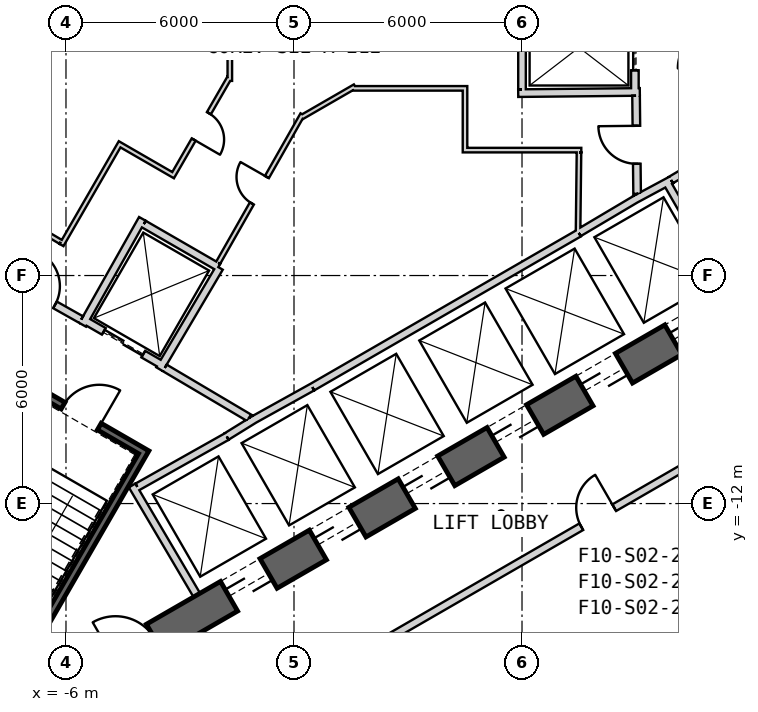
"""IFC4 building model, lengths in metres.
Left out: names, types, materials, properties, quantities, classifications, styles, units other than length and angle.
Written with IfcOpenShell. Run it as: python <this file> out.ifc"""

import sys

from ifc_helpers import new_model, si_unit, direction, frame, frame_2d, origin, place, context, subcontext, project, spatial, rectangle, extrude, element, fill, save


model = new_model("IFC4")
c1 = context("Model", 3, precision=1e-05, world=origin(), true_north=direction((0.0, 1.0)))
c2 = subcontext(c1, "Body", "Model", "MODEL_VIEW")
j1 = project(units=[si_unit("LENGTHUNIT", "METRE"), si_unit("PLANEANGLEUNIT", "RADIAN")], contexts=[c1])
p1 = place(None, origin())
s1 = spatial("IfcSite", under=j1, at=p1, CompositionType="ELEMENT")
p2 = place(p1, origin())
s2 = spatial("IfcBuilding", under=s1, at=p2, CompositionType="ELEMENT")
p3 = place(p2, frame((0.0, 0.0, 70.1)))
s3 = spatial("IfcBuildingStorey", under=s2, at=p3, CompositionType="ELEMENT", Elevation=70.1)
p4 = place(p3, frame((-7.825, -17.97, 0.0), z_axis=(0.0, 0.0, 1.0), x_axis=(0.866028369851, 0.499994862586, 0.0)))
e1 = element("IfcWall", 1, at=p4, inside=s3, PredefinedType="SHEAR", context=c2, shape_type="SweptSolid", body=[
    extrude(rectangle(XDim=31.523, YDim=0.9, at=frame_2d((15.762, 0.0))), origin(), (0.0, 0.0, 1.0), 4.1),
])
p5 = place(p4, frame((7.062, 0.0, 0.0)))
e2 = element("IfcOpeningElement", 2, at=p5, cuts=e1, PredefinedType="OPENING", context=c2, shape_type="SweptSolid", body=[
    extrude(rectangle(XDim=1.2, YDim=2.4, at=frame_2d((0.6, 1.2))), frame((0.0, 0.46, 0.0), z_axis=(0.0, -1.0, 0.0), x_axis=(1.0, 0.0, 0.0)), (0.0, 0.0, 1.0), 0.92),
])
p6 = place(p4, frame((9.762, 0.0, 0.0)))
e3 = element("IfcOpeningElement", 3, at=p6, cuts=e1, PredefinedType="OPENING", context=c2, shape_type="SweptSolid", body=[
    extrude(rectangle(XDim=1.2, YDim=2.4, at=frame_2d((0.6, 1.2))), frame((0.0, 0.46, 0.0), z_axis=(0.0, -1.0, 0.0), x_axis=(1.0, 0.0, 0.0)), (0.0, 0.0, 1.0), 0.92),
])
p7 = place(p4, frame((12.462, 0.0, 0.0)))
e4 = element("IfcOpeningElement", 4, at=p7, cuts=e1, PredefinedType="OPENING", context=c2, shape_type="SweptSolid", body=[
    extrude(rectangle(XDim=1.2, YDim=2.4, at=frame_2d((0.6, 1.2))), frame((0.0, 0.46, 0.0), z_axis=(0.0, -1.0, 0.0), x_axis=(1.0, 0.0, 0.0)), (0.0, 0.0, 1.0), 0.92),
])
p8 = place(p4, frame((15.162, 0.0, 0.0)))
e5 = element("IfcOpeningElement", 5, at=p8, cuts=e1, PredefinedType="OPENING", context=c2, shape_type="SweptSolid", body=[
    extrude(rectangle(XDim=1.2, YDim=2.4, at=frame_2d((0.6, 1.2))), frame((0.0, 0.46, 0.0), z_axis=(0.0, -1.0, 0.0), x_axis=(1.0, 0.0, 0.0)), (0.0, 0.0, 1.0), 0.92),
])
p9 = place(p4, frame((17.862, 0.0, 0.0)))
e6 = element("IfcOpeningElement", 6, at=p9, cuts=e1, PredefinedType="OPENING", context=c2, shape_type="SweptSolid", body=[
    extrude(rectangle(XDim=1.2, YDim=2.4, at=frame_2d((0.6, 1.2))), frame((0.0, 0.46, 0.0), z_axis=(0.0, -1.0, 0.0), x_axis=(1.0, 0.0, 0.0)), (0.0, 0.0, 1.0), 0.92),
])
p10 = place(p4, frame((20.562, 0.0, 0.0)))
e7 = element("IfcOpeningElement", 7, at=p10, cuts=e1, PredefinedType="OPENING", context=c2, shape_type="SweptSolid", body=[
    extrude(rectangle(XDim=1.2, YDim=2.4, at=frame_2d((0.6, 1.2))), frame((0.0, 0.46, 0.0), z_axis=(0.0, -1.0, 0.0), x_axis=(1.0, 0.0, 0.0)), (0.0, 0.0, 1.0), 0.92),
])
p11 = place(p4, frame((26.712, 0.0, 0.0)))
e8 = element("IfcOpeningElement", 8, at=p11, cuts=e1, PredefinedType="OPENING", context=c2, shape_type="SweptSolid", body=[
    extrude(rectangle(XDim=1.2, YDim=2.4, at=frame_2d((0.6, 1.2))), frame((0.0, 0.46, 0.0), z_axis=(0.0, -1.0, 0.0), x_axis=(1.0, 0.0, 0.0)), (0.0, 0.0, 1.0), 0.92),
])
p12 = place(p4, frame((3.612, 0.0, 0.0)))
e9 = element("IfcOpeningElement", 9, at=p12, cuts=e1, PredefinedType="OPENING", context=c2, shape_type="SweptSolid", body=[
    extrude(rectangle(XDim=1.2, YDim=2.4, at=frame_2d((0.6, 1.2))), frame((0.0, 0.46, 0.0), z_axis=(0.0, -1.0, 0.0), x_axis=(1.0, 0.0, 0.0)), (0.0, 0.0, 1.0), 0.92),
])
p13 = place(p3, frame((0.483, -8.936, 0.0), z_axis=(0.0, 0.0, 1.0), x_axis=(0.866030989016, 0.499990325971, 0.0)))
e10 = element("IfcWall", 10, at=p13, inside=s3, PredefinedType="PLUMBINGWALL", context=c2, shape_type="SweptSolid", body=[
    extrude(rectangle(XDim=8.1, YDim=0.2, at=frame_2d((4.05, 0.0))), origin(), (0.0, 0.0, 1.0), 3.8),
])
p14 = place(p3, frame((9.795, -3.525, 0.0), z_axis=(0.0, 0.0, 1.0), x_axis=(0.499984717929, -0.866034226713, 0.0)))
e11 = element("IfcWall", 11, at=p14, inside=s3, PredefinedType="PLUMBINGWALL", context=c2, shape_type="SweptSolid", body=[
    extrude(rectangle(XDim=3.25, YDim=0.2, at=frame_2d((1.625, 0.0))), origin(), (0.0, 0.0, 1.0), 3.8),
])
p15 = place(p3, frame((8.974, -3.999, 0.0), z_axis=(0.0, 0.0, 1.0), x_axis=(0.880907015104, 0.473289373154, 0.0)))
e12 = element("IfcWall", 12, at=p15, inside=s3, PredefinedType="PLUMBINGWALL", context=c2, shape_type="SweptSolid", body=[
    extrude(rectangle(XDim=1.078, YDim=0.2, at=frame_2d((0.539, 0.0))), origin(), (0.0, 0.0, 1.0), 3.8),
])
p16 = place(p3, frame((7.493, -4.878, 0.0), z_axis=(0.0, 0.0, 1.0), x_axis=(0.859981807212, 0.510324691999, 0.0)))
e13 = element("IfcWall", 13, at=p16, inside=s3, PredefinedType="PLUMBINGWALL", context=c2, shape_type="SweptSolid", body=[
    extrude(rectangle(XDim=1.845, YDim=0.2, at=frame_2d((0.922, 0.0))), origin(), (0.0, 0.0, 1.0), 3.8),
])
p17 = place(p3, frame((-2.558, -14.409, 0.0), z_axis=(0.0, 0.0, 1.0), x_axis=(-0.507997497166, 0.861358544901, 0.0)))
e14 = element("IfcWall", 14, at=p17, inside=s3, PredefinedType="PLUMBINGWALL", context=c2, shape_type="SweptSolid", body=[
    extrude(rectangle(XDim=3.35, YDim=0.2, at=frame_2d((1.675, 0.0))), origin(), (0.0, 0.0, 1.0), 3.8),
])
p18 = place(p3, frame((-1.769, -10.237, 0.0), z_axis=(0.0, 0.0, 1.0), x_axis=(-0.871534483978, -0.490334215854, 0.0)))
e15 = element("IfcWall", 15, at=p18, inside=s3, PredefinedType="PLUMBINGWALL", context=c2, shape_type="SweptSolid", body=[
    extrude(rectangle(XDim=2.7, YDim=0.2, at=frame_2d((1.35, 0.0))), origin(), (0.0, 0.0, 1.0), 3.8),
])
p19 = place(p3, frame((-1.024, -9.771, 0.0), z_axis=(0.0, 0.0, 1.0), x_axis=(-0.850348075135, -0.526220629693, 0.0)))
e16 = element("IfcWall", 16, at=p19, inside=s3, PredefinedType="PLUMBINGWALL", context=c2, shape_type="SweptSolid", body=[
    extrude(rectangle(XDim=0.878, YDim=0.2, at=frame_2d((0.439, 0.0))), origin(), (0.0, 0.0, 1.0), 3.8),
])
p20 = place(p3, frame((-1.13, -9.831, 0.0), z_axis=(0.0, 0.0, 1.0), x_axis=(0.874269620932, 0.485440655401, 0.0)))
e17 = element("IfcWall", 17, at=p20, inside=s3, PredefinedType="PLUMBINGWALL", context=c2, shape_type="SweptSolid", body=[
    extrude(rectangle(XDim=1.845, YDim=0.2, at=frame_2d((0.922, 0.0))), origin(), (0.0, 0.0, 1.0), 3.8),
])
p21 = place(p3, frame((8.97, 1.2, 0.0), z_axis=(0.0, 0.0, 1.0), x_axis=(0.0, -1.0, 0.0)))
e18 = element("IfcWall", 18, at=p21, inside=s3, PredefinedType="PLUMBINGWALL", context=c2, shape_type="SweptSolid", body=[
    extrude(rectangle(XDim=2.4, YDim=0.2, at=frame_2d((1.2, 0.0))), origin(), (0.0, 0.0, 1.0), 3.8),
])
p22 = place(p21, frame((0.6, 0.0, 0.0)))
e19 = element("IfcOpeningElement", 19, at=p22, cuts=e18, PredefinedType="OPENING", context=c2, shape_type="SweptSolid", body=[
    extrude(rectangle(XDim=1.2, YDim=2.4, at=frame_2d((0.6, 1.2))), frame((0.0, 0.11, 0.0), z_axis=(0.0, -1.0, 0.0), x_axis=(1.0, 0.0, 0.0)), (0.0, 0.0, 1.0), 0.22),
])
p23 = place(p3, frame((5.9, -1.201, 0.0), z_axis=(0.0, 0.0, 1.0), x_axis=(0.999950064753, 0.009993397809, 0.0)))
e20 = element("IfcWall", 20, at=p23, inside=s3, PredefinedType="PLUMBINGWALL", context=c2, shape_type="SweptSolid", body=[
    extrude(rectangle(XDim=3.2, YDim=0.2, at=frame_2d((1.6, 0.0))), origin(), (0.0, 0.0, 1.0), 3.8),
])
p24 = place(p3, frame((6.0, -1.1, 0.0), z_axis=(0.0, 0.0, 1.0), x_axis=(0.0, 1.0, 0.0)))
e21 = element("IfcWall", 21, at=p24, inside=s3, PredefinedType="PLUMBINGWALL", context=c2, shape_type="SweptSolid", body=[
    extrude(rectangle(XDim=2.28, YDim=0.2, at=frame_2d((1.14, 0.0))), origin(), (0.0, 0.0, 1.0), 3.8),
])
p25 = place(p3, frame((-3.905, -10.563, -0.3), z_axis=(0.0, 0.0, 1.0), x_axis=(-0.500012932018, -0.866017937352, 0.0)))
e22 = element("IfcWall", 22, at=p25, inside=s3, PredefinedType="SHEAR", context=c2, shape_type="SweptSolid", body=[
    extrude(rectangle(XDim=8.1, YDim=0.2, at=frame_2d((4.05, 0.0))), origin(), (0.0, 0.0, 1.0), 4.1),
])
p26 = place(p3, frame((-4.041, -10.599, -0.3), z_axis=(0.0, 0.0, 1.0), x_axis=(-0.866047807691, 0.499961193289, 0.0)))
e23 = element("IfcWall", 23, at=p26, inside=s3, PredefinedType="SHEAR", context=c2, shape_type="SweptSolid", body=[
    extrude(rectangle(XDim=3.6, YDim=0.2, at=frame_2d((1.8, 0.0))), origin(), (0.0, 0.0, 1.0), 4.1),
])
p27 = place(p26, frame((1.25, 0.0, 0.3)))
e24 = element("IfcOpeningElement", 24, at=p27, cuts=e23, PredefinedType="OPENING", context=c2, shape_type="SweptSolid", body=[
    extrude(rectangle(XDim=1.1, YDim=2.1, at=frame_2d((0.55, 1.05))), frame((0.0, 0.11, 0.0), z_axis=(0.0, -1.0, 0.0), x_axis=(1.0, 0.0, 0.0)), (0.0, 0.0, 1.0), 0.22),
])
p28 = place(p3, frame((-3.446, -8.368, 0.0), z_axis=(0.0, 0.0, 1.0), x_axis=(-0.866024647952, 0.500001309137, 0.0)))
e25 = element("IfcWall", 25, at=p28, inside=s3, PredefinedType="PLUMBINGWALL", context=c2, shape_type="SweptSolid", body=[
    extrude(rectangle(XDim=2.4, YDim=0.2, at=frame_2d((1.2, 0.0))), origin(), (0.0, 0.0, 1.0), 3.8),
])
p29 = place(p28, frame((0.6, 0.0, 0.0)))
e26 = element("IfcOpeningElement", 26, at=p29, cuts=e25, PredefinedType="OPENING", context=c2, shape_type="SweptSolid", body=[
    extrude(rectangle(XDim=1.2, YDim=2.4, at=frame_2d((0.6, 1.2))), frame((0.0, 0.11, 0.0), z_axis=(0.0, -1.0, 0.0), x_axis=(1.0, 0.0, 0.0)), (0.0, 0.0, 1.0), 0.22),
])
p30 = place(p3, frame((-1.961, -5.796, 0.0), z_axis=(0.0, 0.0, 1.0), x_axis=(-0.508647062354, -0.860975125052, 0.0)))
e27 = element("IfcWall", 27, at=p30, inside=s3, PredefinedType="PLUMBINGWALL", context=c2, shape_type="SweptSolid", body=[
    extrude(rectangle(XDim=3.1, YDim=0.2, at=frame_2d((1.55, 0.0))), origin(), (0.0, 0.0, 1.0), 3.8),
])
p31 = place(p3, frame((-3.99, -4.509, 0.0), z_axis=(0.0, 0.0, 1.0), x_axis=(-0.491358283181, -0.870957540612, 0.0)))
e28 = element("IfcWall", 28, at=p31, inside=s3, PredefinedType="PLUMBINGWALL", context=c2, shape_type="SweptSolid", body=[
    extrude(rectangle(XDim=3.2, YDim=0.2, at=frame_2d((1.6, 0.0))), origin(), (0.0, 0.0, 1.0), 3.8),
])
p32 = place(p3, frame((-3.953, -4.646, 0.0), z_axis=(0.0, 0.0, 1.0), x_axis=(0.866065302921, -0.4999308863, 0.0)))
e29 = element("IfcWall", 29, at=p32, inside=s3, PredefinedType="PLUMBINGWALL", context=c2, shape_type="SweptSolid", body=[
    extrude(rectangle(XDim=2.264, YDim=0.2, at=frame_2d((1.132, 0.0))), origin(), (0.0, 0.0, 1.0), 3.8),
])
p33 = place(p3, frame((12.245, -2.109, 0.0), z_axis=(0.0, 0.0, 1.0), x_axis=(-0.860414880418, -0.509594185166, 0.0)))
e30 = element("IfcWall", 30, at=p33, inside=s3, PredefinedType="PARTITIONING", context=c2, shape_type="SweptSolid", body=[
    extrude(rectangle(XDim=2.7, YDim=0.2, at=frame_2d((1.35, 0.0))), origin(), (0.0, 0.0, 1.0), 3.8),
])
p34 = place(p3, frame((9.029, -3.851, 0.0), z_axis=(0.0, 0.0, 1.0), x_axis=(-0.010783593937, 0.99994185536, 0.0)))
e31 = element("IfcWall", 31, at=p34, inside=s3, PredefinedType="PARTITIONING", context=c2, shape_type="SweptSolid", body=[
    extrude(rectangle(XDim=2.581, YDim=0.2, at=frame_2d((1.291, 0.0))), origin(), (0.0, 0.0, 1.0), 3.8),
])
p35 = place(p34, frame((0.791, 0.0, 0.0)))
e32 = element("IfcOpeningElement", 32, at=p35, cuts=e31, PredefinedType="OPENING", context=c2, shape_type="SweptSolid", body=[
    extrude(rectangle(XDim=1.0, YDim=2.1, at=frame_2d((0.5, 1.05))), frame((0.0, 0.11, 0.0), z_axis=(0.0, -1.0, 0.0), x_axis=(1.0, 0.0, 0.0)), (0.0, 0.0, 1.0), 0.22),
])
p36 = place(p3, frame((-3.401, -8.43, 0.0), z_axis=(0.0, 0.0, 1.0), x_axis=(0.860615607571, -0.509255118781, 0.0)))
e33 = element("IfcWall", 33, at=p36, inside=s3, PredefinedType="PARTITIONING", context=c2, shape_type="SweptSolid", body=[
    extrude(rectangle(XDim=2.581, YDim=0.2, at=frame_2d((1.29, 0.0))), origin(), (0.0, 0.0, 1.0), 3.8),
])
p37 = place(p3, frame((-7.849, -5.894, 0.0), z_axis=(0.0, 0.0, 1.0), x_axis=(0.871363259478, -0.490638431059, 0.0)))
e34 = element("IfcWall", 34, at=p37, inside=s3, PredefinedType="PARTITIONING", context=c2, shape_type="SweptSolid", body=[
    extrude(rectangle(XDim=2.581, YDim=0.2, at=frame_2d((1.291, 0.0))), origin(), (0.0, 0.0, 1.0), 3.8),
])
p38 = place(p37, frame((0.791, 0.0, 0.0)))
e35 = element("IfcOpeningElement", 35, at=p38, cuts=e34, PredefinedType="OPENING", context=c2, shape_type="SweptSolid", body=[
    extrude(rectangle(XDim=1.0, YDim=2.1, at=frame_2d((0.5, 1.05))), frame((0.0, 0.11, 0.0), z_axis=(0.0, -1.0, 0.0), x_axis=(1.0, 0.0, 0.0)), (0.0, 0.0, 1.0), 0.22),
])
p39 = place(p3, frame((0.224, -1.761, 0.0), z_axis=(0.0, 0.0, 1.0), x_axis=(-0.494327216836, -0.869275907118, 0.0)))
e36 = element("IfcWall", 36, at=p39, inside=s3, PredefinedType="PARTITIONING", context=c2, shape_type="SweptSolid", body=[
    extrude(rectangle(XDim=4.487, YDim=0.12, at=frame_2d((2.244, 0.0))), origin(), (0.0, 0.0, 1.0), 3.8),
])
p40 = place(p39, frame((1.895, 0.0, 0.0)))
e37 = element("IfcOpeningElement", 37, at=p40, cuts=e36, PredefinedType="OPENING", context=c2, shape_type="SweptSolid", body=[
    extrude(rectangle(XDim=0.8, YDim=2.1, at=frame_2d((0.4, 1.05))), frame((0.0, 0.07, 0.0), z_axis=(0.0, -1.0, 0.0), x_axis=(1.0, 0.0, 0.0)), (0.0, 0.0, 1.0), 0.14),
])
p41 = place(p3, frame((1.605, -1.023, 0.0), z_axis=(0.0, 0.0, 1.0), x_axis=(-0.866001581989, -0.50004125829, 0.0)))
e38 = element("IfcWall", 38, at=p41, inside=s3, PredefinedType="PARTITIONING", context=c2, shape_type="SweptSolid", body=[
    extrude(rectangle(XDim=1.635, YDim=0.12, at=frame_2d((0.817, 0.0))), origin(), (0.0, 0.0, 1.0), 3.8),
])
p42 = place(p3, frame((4.56, -1.075, 0.0), z_axis=(0.0, 0.0, 1.0), x_axis=(-1.0, 0.0, 0.0)))
e39 = element("IfcWall", 39, at=p42, inside=s3, PredefinedType="PARTITIONING", context=c2, shape_type="SweptSolid", body=[
    extrude(rectangle(XDim=3.026, YDim=0.12, at=frame_2d((1.513, 0.0))), origin(), (0.0, 0.0, 1.0), 3.8),
])
p43 = place(p3, frame((4.5, -2.76, 0.0), z_axis=(0.0, 0.0, 1.0), x_axis=(0.0, 1.0, 0.0)))
e40 = element("IfcWall", 40, at=p43, inside=s3, PredefinedType="PARTITIONING", context=c2, shape_type="SweptSolid", body=[
    extrude(rectangle(XDim=1.625, YDim=0.12, at=frame_2d((0.812, 0.0))), origin(), (0.0, 0.0, 1.0), 3.8),
])
p44 = place(p3, frame((7.56, -2.7, 0.0), z_axis=(0.0, 0.0, 1.0), x_axis=(-1.0, 0.0, 0.0)))
e41 = element("IfcWall", 41, at=p44, inside=s3, PredefinedType="PARTITIONING", context=c2, shape_type="SweptSolid", body=[
    extrude(rectangle(XDim=3.0, YDim=0.12, at=frame_2d((1.5, 0.0))), origin(), (0.0, 0.0, 1.0), 3.8),
])
p45 = place(p3, frame((7.475, -4.865, 0.0), z_axis=(0.0, 0.0, 1.0), x_axis=(0.011716133148, 0.999931363757, 0.0)))
e42 = element("IfcWall", 42, at=p45, inside=s3, PredefinedType="PARTITIONING", context=c2, shape_type="SweptSolid", body=[
    extrude(rectangle(XDim=2.105, YDim=0.12, at=frame_2d((1.052, 0.0))), origin(), (0.0, 0.0, 1.0), 3.8),
])
p46 = place(p3, frame((-1.689, -0.879, 0.0), z_axis=(0.0, 0.0, 1.0), x_axis=(0.0, 1.0, 0.0)))
e43 = element("IfcWall", 43, at=p46, inside=s3, PredefinedType="PARTITIONING", context=c2, shape_type="SweptSolid", body=[
    extrude(rectangle(XDim=1.635, YDim=0.12, at=frame_2d((0.818, 0.0))), origin(), (0.0, 0.0, 1.0), 3.8),
])
p47 = place(p3, frame((-3.211, -3.412, 0.0), z_axis=(0.0, 0.0, 1.0), x_axis=(0.499983190554, 0.866035108505, 0.0)))
e44 = element("IfcWall", 44, at=p47, inside=s3, PredefinedType="PARTITIONING", context=c2, shape_type="SweptSolid", body=[
    extrude(rectangle(XDim=3.026, YDim=0.12, at=frame_2d((1.513, 0.0))), origin(), (0.0, 0.0, 1.0), 3.8),
])
p48 = place(p47, frame((1.143, 0.0, 0.0)))
e45 = element("IfcOpeningElement", 45, at=p48, cuts=e44, PredefinedType="OPENING", context=c2, shape_type="SweptSolid", body=[
    extrude(rectangle(XDim=0.8, YDim=2.1, at=frame_2d((0.4, 1.05))), frame((0.0, 0.07, 0.0), z_axis=(0.0, -1.0, 0.0), x_axis=(1.0, 0.0, 0.0)), (0.0, 0.0, 1.0), 0.14),
])
p49 = place(p3, frame((-4.64, -2.517, 0.0), z_axis=(0.0, 0.0, 1.0), x_axis=(0.866015446554, -0.500017246033, 0.0)))
e46 = element("IfcWall", 46, at=p49, inside=s3, PredefinedType="PARTITIONING", context=c2, shape_type="SweptSolid", body=[
    extrude(rectangle(XDim=1.625, YDim=0.12, at=frame_2d((0.812, 0.0))), origin(), (0.0, 0.0, 1.0), 3.8),
])
p50 = place(p3, frame((-6.118, -5.197, 0.0), z_axis=(0.0, 0.0, 1.0), x_axis=(0.499990139034, 0.866031096941, 0.0)))
e47 = element("IfcWall", 47, at=p50, inside=s3, PredefinedType="PARTITIONING", context=c2, shape_type="SweptSolid", body=[
    extrude(rectangle(XDim=3.0, YDim=0.12, at=frame_2d((1.5, 0.0))), origin(), (0.0, 0.0, 1.0), 3.8),
])
p51 = place(p3, frame((-7.95, -4.041, 0.0), z_axis=(0.0, 0.0, 1.0), x_axis=(0.860112457103, -0.510104461004, 0.0)))
e48 = element("IfcWall", 48, at=p51, inside=s3, PredefinedType="PARTITIONING", context=c2, shape_type="SweptSolid", body=[
    extrude(rectangle(XDim=2.104, YDim=0.12, at=frame_2d((1.052, 0.0))), origin(), (0.0, 0.0, 1.0), 3.8),
])
p52 = place(p3, frame((2.144, -15.737, 0.0), z_axis=(0.0, 0.0, 1.0), x_axis=(0.866019431537, 0.500010344094, 0.0)))
e49 = element("IfcWall", 49, at=p52, inside=s3, PredefinedType="PARTITIONING", context=c2, shape_type="SweptSolid", body=[
    extrude(rectangle(XDim=13.531, YDim=0.2, at=frame_2d((6.766, 0.0))), origin(), (0.0, 0.0, 1.0), 3.08),
])
p53 = place(p52, frame((6.254, 0.0, 0.0)))
e50 = element("IfcOpeningElement", 50, at=p53, cuts=e49, PredefinedType="OPENING", context=c2, shape_type="SweptSolid", body=[
    extrude(rectangle(XDim=1.0, YDim=2.1, at=frame_2d((0.5, 1.05))), frame((0.0, 0.11, 0.0), z_axis=(0.0, -1.0, 0.0), x_axis=(1.0, 0.0, 0.0)), (0.0, 0.0, 1.0), 0.22),
])
p54 = place(p35, origin())
e51 = element("IfcDoor", 51, at=p54, inside=s3, OperationType="SINGLE_SWING_RIGHT", PredefinedType="USERDEFINED", context=c2, shape_type="SweptSolid", body=[
    extrude(rectangle(XDim=1.0, YDim=2.1, at=frame_2d((0.5, 1.05))), frame((0.0, 0.025, 0.0), z_axis=(0.0, -1.0, 0.0), x_axis=(1.0, 0.0, 0.0)), (0.0, 0.0, 1.0), 0.05),
])
fill(e32, e51)
p55 = place(p22, origin())
e52 = element("IfcDoor", 52, at=p55, inside=s3, OperationType="SLIDING_TO_LEFT", PredefinedType="USERDEFINED", context=c2, shape_type="SweptSolid", body=[
    extrude(rectangle(XDim=1.2, YDim=2.4, at=frame_2d((0.6, 1.2))), frame((0.0, 0.025, 0.0), z_axis=(0.0, -1.0, 0.0), x_axis=(1.0, 0.0, 0.0)), (0.0, 0.0, 1.0), 0.05),
])
fill(e19, e52)
p56 = place(p27, origin())
e53 = element("IfcDoor", 53, at=p56, inside=s3, OperationType="SINGLE_SWING_LEFT", PredefinedType="USERDEFINED", context=c2, shape_type="SweptSolid", body=[
    extrude(rectangle(XDim=1.1, YDim=2.1, at=frame_2d((0.55, 1.05))), frame((0.0, 0.025, 0.0), z_axis=(0.0, -1.0, 0.0), x_axis=(1.0, 0.0, 0.0)), (0.0, 0.0, 1.0), 0.05),
])
fill(e24, e53)
p57 = place(p38, origin())
e54 = element("IfcDoor", 54, at=p57, inside=s3, OperationType="SINGLE_SWING_LEFT", PredefinedType="USERDEFINED", context=c2, shape_type="SweptSolid", body=[
    extrude(rectangle(XDim=1.0, YDim=2.1, at=frame_2d((0.5, 1.05))), frame((0.0, 0.025, 0.0), z_axis=(0.0, -1.0, 0.0), x_axis=(1.0, 0.0, 0.0)), (0.0, 0.0, 1.0), 0.05),
])
fill(e35, e54)
p58 = place(p29, origin())
e55 = element("IfcDoor", 55, at=p58, inside=s3, OperationType="SLIDING_TO_LEFT", PredefinedType="USERDEFINED", context=c2, shape_type="SweptSolid", body=[
    extrude(rectangle(XDim=1.2, YDim=2.4, at=frame_2d((0.6, 1.2))), frame((0.0, 0.025, 0.0), z_axis=(0.0, -1.0, 0.0), x_axis=(1.0, 0.0, 0.0)), (0.0, 0.0, 1.0), 0.05),
])
fill(e26, e55)
p59 = place(p40, origin())
e56 = element("IfcDoor", 56, at=p59, inside=s3, OperationType="SINGLE_SWING_LEFT", PredefinedType="USERDEFINED", context=c2, shape_type="SweptSolid", body=[
    extrude(rectangle(XDim=0.8, YDim=2.1, at=frame_2d((0.4, 1.05))), frame((0.0, 0.025, 0.0), z_axis=(0.0, -1.0, 0.0), x_axis=(1.0, 0.0, 0.0)), (0.0, 0.0, 1.0), 0.05),
])
fill(e37, e56)
p60 = place(p48, origin())
e57 = element("IfcDoor", 57, at=p60, inside=s3, OperationType="SINGLE_SWING_LEFT", PredefinedType="USERDEFINED", context=c2, shape_type="SweptSolid", body=[
    extrude(rectangle(XDim=0.8, YDim=2.1, at=frame_2d((0.4, 1.05))), frame((0.0, 0.025, 0.0), z_axis=(0.0, -1.0, 0.0), x_axis=(1.0, 0.0, 0.0)), (0.0, 0.0, 1.0), 0.05),
])
fill(e45, e57)
p61 = place(p53, origin())
e58 = element("IfcDoor", 58, at=p61, inside=s3, OperationType="SINGLE_SWING_RIGHT", PredefinedType="USERDEFINED", context=c2, shape_type="SweptSolid", body=[
    extrude(rectangle(XDim=1.0, YDim=2.1, at=frame_2d((0.5, 1.05))), frame((0.0, 0.025, 0.0), z_axis=(0.0, -1.0, 0.0), x_axis=(1.0, 0.0, 0.0)), (0.0, 0.0, 1.0), 0.05),
])
fill(e50, e58)
p62 = place(p5, origin())
e59 = element("IfcDoor", 59, at=p62, inside=s3, OperationType="SLIDING_TO_LEFT", PredefinedType="USERDEFINED", context=c2, shape_type="SweptSolid", body=[
    extrude(rectangle(XDim=1.2, YDim=2.4, at=frame_2d((0.6, 1.2))), frame((0.0, 0.025, 0.0), z_axis=(0.0, -1.0, 0.0), x_axis=(1.0, 0.0, 0.0)), (0.0, 0.0, 1.0), 0.05),
])
fill(e2, e59)
p63 = place(p6, origin())
e60 = element("IfcDoor", 60, at=p63, inside=s3, OperationType="SLIDING_TO_LEFT", PredefinedType="USERDEFINED", context=c2, shape_type="SweptSolid", body=[
    extrude(rectangle(XDim=1.2, YDim=2.4, at=frame_2d((0.6, 1.2))), frame((0.0, 0.025, 0.0), z_axis=(0.0, -1.0, 0.0), x_axis=(1.0, 0.0, 0.0)), (0.0, 0.0, 1.0), 0.05),
])
fill(e3, e60)
p64 = place(p7, origin())
e61 = element("IfcDoor", 61, at=p64, inside=s3, OperationType="SLIDING_TO_LEFT", PredefinedType="USERDEFINED", context=c2, shape_type="SweptSolid", body=[
    extrude(rectangle(XDim=1.2, YDim=2.4, at=frame_2d((0.6, 1.2))), frame((0.0, 0.025, 0.0), z_axis=(0.0, -1.0, 0.0), x_axis=(1.0, 0.0, 0.0)), (0.0, 0.0, 1.0), 0.05),
])
fill(e4, e61)
p65 = place(p8, origin())
e62 = element("IfcDoor", 62, at=p65, inside=s3, OperationType="SLIDING_TO_LEFT", PredefinedType="USERDEFINED", context=c2, shape_type="SweptSolid", body=[
    extrude(rectangle(XDim=1.2, YDim=2.4, at=frame_2d((0.6, 1.2))), frame((0.0, 0.025, 0.0), z_axis=(0.0, -1.0, 0.0), x_axis=(1.0, 0.0, 0.0)), (0.0, 0.0, 1.0), 0.05),
])
fill(e5, e62)
p66 = place(p9, origin())
e63 = element("IfcDoor", 63, at=p66, inside=s3, OperationType="SLIDING_TO_LEFT", PredefinedType="USERDEFINED", context=c2, shape_type="SweptSolid", body=[
    extrude(rectangle(XDim=1.2, YDim=2.4, at=frame_2d((0.6, 1.2))), frame((0.0, 0.025, 0.0), z_axis=(0.0, -1.0, 0.0), x_axis=(1.0, 0.0, 0.0)), (0.0, 0.0, 1.0), 0.05),
])
fill(e6, e63)
p67 = place(p10, origin())
e64 = element("IfcDoor", 64, at=p67, inside=s3, OperationType="SLIDING_TO_LEFT", PredefinedType="USERDEFINED", context=c2, shape_type="SweptSolid", body=[
    extrude(rectangle(XDim=1.2, YDim=2.4, at=frame_2d((0.6, 1.2))), frame((0.0, 0.025, 0.0), z_axis=(0.0, -1.0, 0.0), x_axis=(1.0, 0.0, 0.0)), (0.0, 0.0, 1.0), 0.05),
])
fill(e7, e64)
save(model, sys.argv[1])
